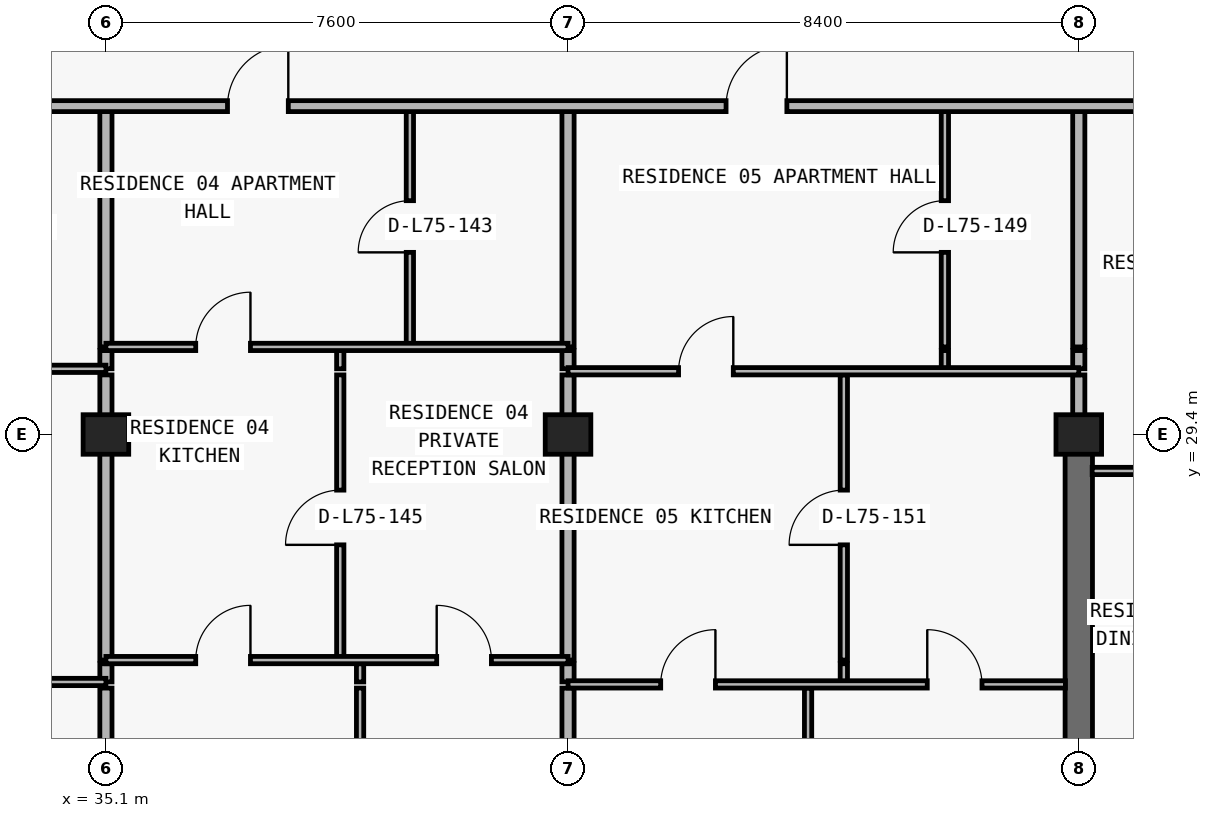
"""IFC4 building model, lengths in metres.
Left out: names, types, materials, properties, quantities, classifications, styles, units other than length and angle.
Written with IfcOpenShell. Run it as: python <this file> out.ifc"""

import sys

from ifc_helpers import new_model, si_unit, direction, frame, frame_2d, origin, origin_2d, place, context, subcontext, project, spatial, rectangle, extrude, element, fill, save


model = new_model("IFC4")
c1 = context("Model", 3, precision=1e-05, world=origin(), true_north=direction((0.0, 1.0)))
c2 = subcontext(c1, "Body", "Model", "MODEL_VIEW")
j1 = project(units=[si_unit("LENGTHUNIT", "METRE"), si_unit("PLANEANGLEUNIT", "RADIAN")], contexts=[c1])
p1 = place(None, origin())
s1 = spatial("IfcSite", under=j1, at=p1, CompositionType="ELEMENT")
p2 = place(p1, origin())
s2 = spatial("IfcBuilding", under=s1, at=p2, CompositionType="ELEMENT")
p3 = place(p2, frame((0.0, 0.0, 266.1)))
s3 = spatial("IfcBuildingStorey", under=s2, at=p3, CompositionType="ELEMENT", Elevation=266.1)
for number, where, z_axis, x_axis in (
    (1, (35.1, 29.4, 0.0), (0.0, 0.0, 1.0), (1.0, 0.0, 0.0)),
    (2, (42.7, 29.4, 0.0), (0.0, 0.0, 1.0), (1.0, 0.0, 0.0)),
    (3, (51.1, 29.4, 0.0), (0.0, 0.0, 1.0), (1.0, 0.0, 0.0)),
):
    element("IfcColumn", number, at=place(p3, frame(where, z_axis=z_axis, x_axis=x_axis)), inside=s3, PredefinedType="COLUMN", context=c2, shape_type="SweptSolid", body=[
        extrude(rectangle(XDim=0.75, YDim=0.65, at=origin_2d()), origin(), (0.0, 0.0, 1.0), 3.0),
    ])
p4 = place(p3, frame((51.1, 20.8, 0.0), z_axis=(0.0, 0.0, 1.0), x_axis=(0.0, 1.0, 0.0)))
e4 = element("IfcWall", 4, at=p4, inside=s3, PredefinedType="SHEAR", context=c2, shape_type="SweptSolid", body=[
    extrude(rectangle(XDim=8.6, YDim=0.45, at=frame_2d((4.3, 0.0))), origin(), (0.0, 0.0, 1.0), 3.0),
])
p5 = place(p3, frame((35.1, 13.34, 0.0), z_axis=(0.0, 0.0, 1.0), x_axis=(0.0, 1.0, 0.0)))
e5 = element("IfcWall", 5, at=p5, inside=s3, PredefinedType="PARTITIONING", context=c2, shape_type="SweptSolid", body=[
    extrude(rectangle(XDim=11.89, YDim=0.2, at=frame_2d((5.945, 0.0))), origin(), (0.0, 0.0, 1.0), 2.213),
])
p6 = place(p3, frame((35.1, 25.33, 0.0), z_axis=(0.0, 0.0, 1.0), x_axis=(0.0, 1.0, 0.0)))
e6 = element("IfcWall", 6, at=p6, inside=s3, PredefinedType="PARTITIONING", context=c2, shape_type="SweptSolid", body=[
    extrude(rectangle(XDim=0.3, YDim=0.2, at=frame_2d((0.15, 0.0))), origin(), (0.0, 0.0, 1.0), 2.213),
])
p7 = place(p3, frame((35.1, 25.69, 0.0), z_axis=(0.0, 0.0, 1.0), x_axis=(0.0, 1.0, 0.0)))
e7 = element("IfcWall", 7, at=p7, inside=s3, PredefinedType="PARTITIONING", context=c2, shape_type="SweptSolid", body=[
    extrude(rectangle(XDim=4.69, YDim=0.2, at=frame_2d((2.345, 0.0))), origin(), (0.0, 0.0, 1.0), 2.213),
])
p8 = place(p3, frame((35.1, 30.48, 0.0), z_axis=(0.0, 0.0, 1.0), x_axis=(0.0, 1.0, 0.0)))
e8 = element("IfcWall", 8, at=p8, inside=s3, PredefinedType="PARTITIONING", context=c2, shape_type="SweptSolid", body=[
    extrude(rectangle(XDim=0.3, YDim=0.2, at=frame_2d((0.15, 0.0))), origin(), (0.0, 0.0, 1.0), 2.213),
])
p9 = place(p3, frame((35.1, 30.84, 0.0), z_axis=(0.0, 0.0, 1.0), x_axis=(0.0, 1.0, 0.0)))
e9 = element("IfcWall", 9, at=p9, inside=s3, PredefinedType="PARTITIONING", context=c2, shape_type="SweptSolid", body=[
    extrude(rectangle(XDim=3.96, YDim=0.2, at=frame_2d((1.98, 0.0))), origin(), (0.0, 0.0, 1.0), 2.213),
])
p10 = place(p3, frame((38.954, 25.69, 0.0), z_axis=(0.0, 0.0, 1.0), x_axis=(0.0, 1.0, 0.0)))
e10 = element("IfcWall", 10, at=p10, inside=s3, PredefinedType="PARTITIONING", context=c2, shape_type="SweptSolid", body=[
    extrude(rectangle(XDim=4.69, YDim=0.12, at=frame_2d((2.345, 0.0))), origin(), (0.0, 0.0, 1.0), 2.579),
])
p11 = place(p10, frame((1.895, 0.0, 0.0)))
e11 = element("IfcOpeningElement", 11, at=p11, cuts=e10, PredefinedType="OPENING", context=c2, shape_type="SweptSolid", body=[
    extrude(rectangle(XDim=0.9, YDim=2.15, at=frame_2d((0.45, 1.075))), frame((0.0, 0.07, 0.0), z_axis=(0.0, -1.0, 0.0), x_axis=(1.0, 0.0, 0.0)), (0.0, 0.0, 1.0), 0.14),
])
p12 = place(p3, frame((38.954, 30.48, 0.0), z_axis=(0.0, 0.0, 1.0), x_axis=(0.0, 1.0, 0.0)))
e12 = element("IfcWall", 12, at=p12, inside=s3, PredefinedType="PARTITIONING", context=c2, shape_type="SweptSolid", body=[
    extrude(rectangle(XDim=0.3, YDim=0.12, at=frame_2d((0.15, 0.0))), origin(), (0.0, 0.0, 1.0), 2.675),
])
p13 = place(p3, frame((39.28, 13.34, 0.0), z_axis=(0.0, 0.0, 1.0), x_axis=(0.0, 1.0, 0.0)))
e13 = element("IfcWall", 13, at=p13, inside=s3, PredefinedType="PARTITIONING", context=c2, shape_type="SweptSolid", body=[
    extrude(rectangle(XDim=11.89, YDim=0.12, at=frame_2d((5.945, 0.0))), origin(), (0.0, 0.0, 1.0), 3.0),
])
p14 = place(p3, frame((39.28, 25.33, 0.0), z_axis=(0.0, 0.0, 1.0), x_axis=(0.0, 1.0, 0.0)))
e14 = element("IfcWall", 14, at=p14, inside=s3, PredefinedType="PARTITIONING", context=c2, shape_type="SweptSolid", body=[
    extrude(rectangle(XDim=0.3, YDim=0.12, at=frame_2d((0.15, 0.0))), origin(), (0.0, 0.0, 1.0), 3.0),
])
p15 = place(p3, frame((40.099, 30.84, 0.0), z_axis=(0.0, 0.0, 1.0), x_axis=(0.0, 1.0, 0.0)))
e15 = element("IfcWall", 15, at=p15, inside=s3, PredefinedType="PARTITIONING", context=c2, shape_type="SweptSolid", body=[
    extrude(rectangle(XDim=3.96, YDim=0.12, at=frame_2d((1.98, 0.0))), origin(), (0.0, 0.0, 1.0), 3.0),
])
p16 = place(p15, frame((1.555, 0.0, 0.0)))
e16 = element("IfcOpeningElement", 16, at=p16, cuts=e15, PredefinedType="OPENING", context=c2, shape_type="SweptSolid", body=[
    extrude(rectangle(XDim=0.85, YDim=2.1, at=frame_2d((0.425, 1.05))), frame((0.0, 0.07, 0.0), z_axis=(0.0, -1.0, 0.0), x_axis=(1.0, 0.0, 0.0)), (0.0, 0.0, 1.0), 0.14),
])
p17 = place(p3, frame((42.7, 13.34, 0.0), z_axis=(0.0, 0.0, 1.0), x_axis=(0.0, 1.0, 0.0)))
e17 = element("IfcWall", 17, at=p17, inside=s3, PredefinedType="PARTITIONING", context=c2, shape_type="SweptSolid", body=[
    extrude(rectangle(XDim=11.89, YDim=0.2, at=frame_2d((5.945, 0.0))), origin(), (0.0, 0.0, 1.0), 2.213),
])
p18 = place(p3, frame((42.7, 25.33, 0.0), z_axis=(0.0, 0.0, 1.0), x_axis=(0.0, 1.0, 0.0)))
e18 = element("IfcWall", 18, at=p18, inside=s3, PredefinedType="PARTITIONING", context=c2, shape_type="SweptSolid", body=[
    extrude(rectangle(XDim=0.3, YDim=0.2, at=frame_2d((0.15, 0.0))), origin(), (0.0, 0.0, 1.0), 2.213),
])
p19 = place(p3, frame((42.7, 25.69, 0.0), z_axis=(0.0, 0.0, 1.0), x_axis=(0.0, 1.0, 0.0)))
e19 = element("IfcWall", 19, at=p19, inside=s3, PredefinedType="PARTITIONING", context=c2, shape_type="SweptSolid", body=[
    extrude(rectangle(XDim=4.69, YDim=0.2, at=frame_2d((2.345, 0.0))), origin(), (0.0, 0.0, 1.0), 2.213),
])
p20 = place(p3, frame((42.7, 30.48, 0.0), z_axis=(0.0, 0.0, 1.0), x_axis=(0.0, 1.0, 0.0)))
e20 = element("IfcWall", 20, at=p20, inside=s3, PredefinedType="PARTITIONING", context=c2, shape_type="SweptSolid", body=[
    extrude(rectangle(XDim=0.3, YDim=0.2, at=frame_2d((0.15, 0.0))), origin(), (0.0, 0.0, 1.0), 2.213),
])
p21 = place(p3, frame((42.7, 30.84, 0.0), z_axis=(0.0, 0.0, 1.0), x_axis=(0.0, 1.0, 0.0)))
e21 = element("IfcWall", 21, at=p21, inside=s3, PredefinedType="PARTITIONING", context=c2, shape_type="SweptSolid", body=[
    extrude(rectangle(XDim=3.96, YDim=0.2, at=frame_2d((1.98, 0.0))), origin(), (0.0, 0.0, 1.0), 2.213),
])
p22 = place(p3, frame((46.648, 13.34, 0.0), z_axis=(0.0, 0.0, 1.0), x_axis=(0.0, 1.0, 0.0)))
e22 = element("IfcWall", 22, at=p22, inside=s3, PredefinedType="PARTITIONING", context=c2, shape_type="SweptSolid", body=[
    extrude(rectangle(XDim=11.89, YDim=0.12, at=frame_2d((5.945, 0.0))), origin(), (0.0, 0.0, 1.0), 3.0),
])
p23 = place(p3, frame((47.236, 25.33, 0.0), z_axis=(0.0, 0.0, 1.0), x_axis=(0.0, 1.0, 0.0)))
e23 = element("IfcWall", 23, at=p23, inside=s3, PredefinedType="PARTITIONING", context=c2, shape_type="SweptSolid", body=[
    extrude(rectangle(XDim=0.3, YDim=0.12, at=frame_2d((0.15, 0.0))), origin(), (0.0, 0.0, 1.0), 3.0),
])
p24 = place(p3, frame((47.236, 25.69, 0.0), z_axis=(0.0, 0.0, 1.0), x_axis=(0.0, 1.0, 0.0)))
e24 = element("IfcWall", 24, at=p24, inside=s3, PredefinedType="PARTITIONING", context=c2, shape_type="SweptSolid", body=[
    extrude(rectangle(XDim=4.69, YDim=0.12, at=frame_2d((2.345, 0.0))), origin(), (0.0, 0.0, 1.0), 3.0),
])
p25 = place(p24, frame((1.895, 0.0, 0.0)))
e25 = element("IfcOpeningElement", 25, at=p25, cuts=e24, PredefinedType="OPENING", context=c2, shape_type="SweptSolid", body=[
    extrude(rectangle(XDim=0.9, YDim=2.15, at=frame_2d((0.45, 1.075))), frame((0.0, 0.07, 0.0), z_axis=(0.0, -1.0, 0.0), x_axis=(1.0, 0.0, 0.0)), (0.0, 0.0, 1.0), 0.14),
])
p26 = place(p3, frame((48.898, 30.48, 0.0), z_axis=(0.0, 0.0, 1.0), x_axis=(0.0, 1.0, 0.0)))
e26 = element("IfcWall", 26, at=p26, inside=s3, PredefinedType="PARTITIONING", context=c2, shape_type="SweptSolid", body=[
    extrude(rectangle(XDim=0.3, YDim=0.12, at=frame_2d((0.15, 0.0))), origin(), (0.0, 0.0, 1.0), 3.0),
])
p27 = place(p3, frame((48.898, 30.84, 0.0), z_axis=(0.0, 0.0, 1.0), x_axis=(0.0, 1.0, 0.0)))
e27 = element("IfcWall", 27, at=p27, inside=s3, PredefinedType="PARTITIONING", context=c2, shape_type="SweptSolid", body=[
    extrude(rectangle(XDim=3.96, YDim=0.12, at=frame_2d((1.98, 0.0))), origin(), (0.0, 0.0, 1.0), 3.0),
])
p28 = place(p27, frame((1.555, 0.0, 0.0)))
e28 = element("IfcOpeningElement", 28, at=p28, cuts=e27, PredefinedType="OPENING", context=c2, shape_type="SweptSolid", body=[
    extrude(rectangle(XDim=0.85, YDim=2.1, at=frame_2d((0.425, 1.05))), frame((0.0, 0.07, 0.0), z_axis=(0.0, -1.0, 0.0), x_axis=(1.0, 0.0, 0.0)), (0.0, 0.0, 1.0), 0.14),
])
p29 = place(p3, frame((51.1, 29.405, 0.0), z_axis=(0.0, 0.0, 1.0), x_axis=(0.0, 1.0, 0.0)))
e29 = element("IfcWall", 29, at=p29, inside=s3, PredefinedType="PARTITIONING", context=c2, shape_type="SweptSolid", body=[
    extrude(rectangle(XDim=0.975, YDim=0.2, at=frame_2d((0.487, 0.0))), origin(), (0.0, 0.0, 1.0), 2.285),
])
p30 = place(p3, frame((51.1, 30.48, 0.0), z_axis=(0.0, 0.0, 1.0), x_axis=(0.0, 1.0, 0.0)))
e30 = element("IfcWall", 30, at=p30, inside=s3, PredefinedType="PARTITIONING", context=c2, shape_type="SweptSolid", body=[
    extrude(rectangle(XDim=0.3, YDim=0.2, at=frame_2d((0.15, 0.0))), origin(), (0.0, 0.0, 1.0), 2.285),
])
p31 = place(p3, frame((51.1, 30.84, 0.0), z_axis=(0.0, 0.0, 1.0), x_axis=(0.0, 1.0, 0.0)))
e31 = element("IfcWall", 31, at=p31, inside=s3, PredefinedType="PARTITIONING", context=c2, shape_type="SweptSolid", body=[
    extrude(rectangle(XDim=3.96, YDim=0.2, at=frame_2d((1.98, 0.0))), origin(), (0.0, 0.0, 1.0), 2.285),
])
p32 = place(p3, frame((42.7, 25.29, 0.0), z_axis=(0.0, 0.0, 1.0), x_axis=(1.0, 0.0, 0.0)))
e32 = element("IfcWall", 32, at=p32, inside=s3, PredefinedType="PARTITIONING", context=c2, shape_type="SweptSolid", body=[
    extrude(rectangle(XDim=8.18, YDim=0.12, at=frame_2d((4.09, 0.0))), origin(), (0.0, 0.0, 1.0), 3.0),
])
p33 = place(p32, frame((1.524, 0.0, 0.0)))
e33 = element("IfcOpeningElement", 33, at=p33, cuts=e32, PredefinedType="OPENING", context=c2, shape_type="SweptSolid", body=[
    extrude(rectangle(XDim=0.9, YDim=2.15, at=frame_2d((0.45, 1.075))), frame((0.0, 0.07, 0.0), z_axis=(0.0, -1.0, 0.0), x_axis=(1.0, 0.0, 0.0)), (0.0, 0.0, 1.0), 0.14),
])
p34 = place(p32, frame((5.908, 0.0, 0.0)))
e34 = element("IfcOpeningElement", 34, at=p34, cuts=e32, PredefinedType="OPENING", context=c2, shape_type="SweptSolid", body=[
    extrude(rectangle(XDim=0.9, YDim=2.15, at=frame_2d((0.45, 1.075))), frame((0.0, 0.07, 0.0), z_axis=(0.0, -1.0, 0.0), x_axis=(1.0, 0.0, 0.0)), (0.0, 0.0, 1.0), 0.14),
])
p35 = place(p3, frame((31.5, 25.33, 0.0), z_axis=(0.0, 0.0, 1.0), x_axis=(1.0, 0.0, 0.0)))
e35 = element("IfcWall", 35, at=p35, inside=s3, PredefinedType="PARTITIONING", context=c2, shape_type="SweptSolid", body=[
    extrude(rectangle(XDim=3.6, YDim=0.12, at=frame_2d((1.8, 0.0))), origin(), (0.0, 0.0, 1.0), 3.0),
])
p36 = place(p35, frame((1.35, 0.0, 0.0)))
e36 = element("IfcOpeningElement", 36, at=p36, cuts=e35, PredefinedType="OPENING", context=c2, shape_type="SweptSolid", body=[
    extrude(rectangle(XDim=0.9, YDim=2.15, at=frame_2d((0.45, 1.075))), frame((0.0, 0.07, 0.0), z_axis=(0.0, -1.0, 0.0), x_axis=(1.0, 0.0, 0.0)), (0.0, 0.0, 1.0), 0.14),
])
p37 = place(p3, frame((35.1, 25.69, 0.0), z_axis=(0.0, 0.0, 1.0), x_axis=(1.0, 0.0, 0.0)))
e37 = element("IfcWall", 37, at=p37, inside=s3, PredefinedType="PARTITIONING", context=c2, shape_type="SweptSolid", body=[
    extrude(rectangle(XDim=7.6, YDim=0.12, at=frame_2d((3.8, 0.0))), origin(), (0.0, 0.0, 1.0), 3.0),
])
p38 = place(p37, frame((1.477, 0.0, 0.0)))
e38 = element("IfcOpeningElement", 38, at=p38, cuts=e37, PredefinedType="OPENING", context=c2, shape_type="SweptSolid", body=[
    extrude(rectangle(XDim=0.9, YDim=2.15, at=frame_2d((0.45, 1.075))), frame((0.0, 0.07, 0.0), z_axis=(0.0, -1.0, 0.0), x_axis=(1.0, 0.0, 0.0)), (0.0, 0.0, 1.0), 0.14),
])
p39 = place(p37, frame((5.44, 0.0, 0.0)))
e39 = element("IfcOpeningElement", 39, at=p39, cuts=e37, PredefinedType="OPENING", context=c2, shape_type="SweptSolid", body=[
    extrude(rectangle(XDim=0.9, YDim=2.15, at=frame_2d((0.45, 1.075))), frame((0.0, 0.07, 0.0), z_axis=(0.0, -1.0, 0.0), x_axis=(1.0, 0.0, 0.0)), (0.0, 0.0, 1.0), 0.14),
])
p40 = place(p3, frame((51.32, 28.8, 0.0), z_axis=(0.0, 0.0, 1.0), x_axis=(1.0, 0.0, 0.0)))
e40 = element("IfcWall", 40, at=p40, inside=s3, PredefinedType="PARTITIONING", context=c2, shape_type="SweptSolid", body=[
    extrude(rectangle(XDim=8.175, YDim=0.12, at=frame_2d((4.087, 0.0))), origin(), (0.0, 0.0, 1.0), 3.0),
])
p41 = place(p40, frame((1.204, 0.0, 0.0)))
e41 = element("IfcOpeningElement", 41, at=p41, cuts=e40, PredefinedType="OPENING", context=c2, shape_type="SweptSolid", body=[
    extrude(rectangle(XDim=0.9, YDim=2.15, at=frame_2d((0.45, 1.075))), frame((0.0, 0.07, 0.0), z_axis=(0.0, -1.0, 0.0), x_axis=(1.0, 0.0, 0.0)), (0.0, 0.0, 1.0), 0.14),
])
p42 = place(p3, frame((42.7, 30.44, 0.0), z_axis=(0.0, 0.0, 1.0), x_axis=(1.0, 0.0, 0.0)))
e42 = element("IfcWall", 42, at=p42, inside=s3, PredefinedType="PARTITIONING", context=c2, shape_type="SweptSolid", body=[
    extrude(rectangle(XDim=8.4, YDim=0.12, at=frame_2d((4.2, 0.0))), origin(), (0.0, 0.0, 1.0), 3.0),
])
p43 = place(p42, frame((1.818, 0.0, 0.0)))
e43 = element("IfcOpeningElement", 43, at=p43, cuts=e42, PredefinedType="OPENING", context=c2, shape_type="SweptSolid", body=[
    extrude(rectangle(XDim=0.9, YDim=2.15, at=frame_2d((0.45, 1.075))), frame((0.0, 0.07, 0.0), z_axis=(0.0, -1.0, 0.0), x_axis=(1.0, 0.0, 0.0)), (0.0, 0.0, 1.0), 0.14),
])
p44 = place(p3, frame((31.5, 30.48, 0.0), z_axis=(0.0, 0.0, 1.0), x_axis=(1.0, 0.0, 0.0)))
e44 = element("IfcWall", 44, at=p44, inside=s3, PredefinedType="PARTITIONING", context=c2, shape_type="SweptSolid", body=[
    extrude(rectangle(XDim=3.6, YDim=0.12, at=frame_2d((1.8, 0.0))), origin(), (0.0, 0.0, 1.0), 3.0),
])
p45 = place(p3, frame((35.1, 30.84, 0.0), z_axis=(0.0, 0.0, 1.0), x_axis=(1.0, 0.0, 0.0)))
e45 = element("IfcWall", 45, at=p45, inside=s3, PredefinedType="PARTITIONING", context=c2, shape_type="SweptSolid", body=[
    extrude(rectangle(XDim=7.6, YDim=0.12, at=frame_2d((3.8, 0.0))), origin(), (0.0, 0.0, 1.0), 3.0),
])
p46 = place(p45, frame((1.477, 0.0, 0.0)))
e46 = element("IfcOpeningElement", 46, at=p46, cuts=e45, PredefinedType="OPENING", context=c2, shape_type="SweptSolid", body=[
    extrude(rectangle(XDim=0.9, YDim=2.15, at=frame_2d((0.45, 1.075))), frame((0.0, 0.07, 0.0), z_axis=(0.0, -1.0, 0.0), x_axis=(1.0, 0.0, 0.0)), (0.0, 0.0, 1.0), 0.14),
])
p47 = place(p3, frame((31.5, 34.8, 0.0), z_axis=(0.0, 0.0, 1.0), x_axis=(1.0, 0.0, 0.0)))
e47 = element("IfcWall", 47, at=p47, inside=s3, PredefinedType="PARTITIONING", context=c2, shape_type="SweptSolid", body=[
    extrude(rectangle(XDim=34.2, YDim=0.18, at=frame_2d((17.1, 0.0))), origin(), (0.0, 0.0, 1.0), 3.0),
])
p48 = place(p47, frame((5.6, 0.0, 0.0)))
e48 = element("IfcOpeningElement", 48, at=p48, cuts=e47, PredefinedType="OPENING", context=c2, shape_type="SweptSolid", body=[
    extrude(rectangle(XDim=1.0, YDim=2.2, at=frame_2d((0.5, 1.1))), frame((0.0, 0.1, 0.0), z_axis=(0.0, -1.0, 0.0), x_axis=(1.0, 0.0, 0.0)), (0.0, 0.0, 1.0), 0.2),
])
p49 = place(p47, frame((13.799, 0.0, 0.0)))
e49 = element("IfcOpeningElement", 49, at=p49, cuts=e47, PredefinedType="OPENING", context=c2, shape_type="SweptSolid", body=[
    extrude(rectangle(XDim=1.0, YDim=2.2, at=frame_2d((0.5, 1.1))), frame((0.0, 0.1, 0.0), z_axis=(0.0, -1.0, 0.0), x_axis=(1.0, 0.0, 0.0)), (0.0, 0.0, 1.0), 0.2),
])
p50 = place(p47, frame((22.483, 0.0, 0.0)))
e50 = element("IfcOpeningElement", 50, at=p50, cuts=e47, PredefinedType="OPENING", context=c2, shape_type="SweptSolid", body=[
    extrude(rectangle(XDim=1.0, YDim=2.2, at=frame_2d((0.5, 1.1))), frame((0.0, 0.1, 0.0), z_axis=(0.0, -1.0, 0.0), x_axis=(1.0, 0.0, 0.0)), (0.0, 0.0, 1.0), 0.2),
])
p51 = place(p48, origin())
e51 = element("IfcDoor", 51, at=p51, inside=s3, OperationType="SINGLE_SWING_RIGHT", PredefinedType="DOOR", context=c2, shape_type="SweptSolid", body=[
    extrude(rectangle(XDim=1.0, YDim=2.2, at=frame_2d((0.5, 1.1))), frame((0.0, 0.025, 0.0), z_axis=(0.0, -1.0, 0.0), x_axis=(1.0, 0.0, 0.0)), (0.0, 0.0, 1.0), 0.05),
])
fill(e48, e51)
p52 = place(p16, origin())
e52 = element("IfcDoor", 52, at=p52, inside=s3, OperationType="SINGLE_SWING_LEFT", PredefinedType="DOOR", context=c2, shape_type="SweptSolid", body=[
    extrude(rectangle(XDim=0.85, YDim=2.1, at=frame_2d((0.425, 1.05))), frame((0.0, 0.025, 0.0), z_axis=(0.0, -1.0, 0.0), x_axis=(1.0, 0.0, 0.0)), (0.0, 0.0, 1.0), 0.05),
])
fill(e16, e52)
p53 = place(p46, origin())
e53 = element("IfcDoor", 53, at=p53, inside=s3, OperationType="SINGLE_SWING_RIGHT", PredefinedType="DOOR", context=c2, shape_type="SweptSolid", body=[
    extrude(rectangle(XDim=0.9, YDim=2.15, at=frame_2d((0.45, 1.075))), frame((0.0, 0.025, 0.0), z_axis=(0.0, -1.0, 0.0), x_axis=(1.0, 0.0, 0.0)), (0.0, 0.0, 1.0), 0.05),
])
fill(e46, e53)
p54 = place(p11, origin())
e54 = element("IfcDoor", 54, at=p54, inside=s3, OperationType="SINGLE_SWING_LEFT", PredefinedType="DOOR", context=c2, shape_type="SweptSolid", body=[
    extrude(rectangle(XDim=0.9, YDim=2.15, at=frame_2d((0.45, 1.075))), frame((0.0, 0.025, 0.0), z_axis=(0.0, -1.0, 0.0), x_axis=(1.0, 0.0, 0.0)), (0.0, 0.0, 1.0), 0.05),
])
fill(e11, e54)
p55 = place(p38, origin())
e55 = element("IfcDoor", 55, at=p55, inside=s3, OperationType="SINGLE_SWING_RIGHT", PredefinedType="DOOR", context=c2, shape_type="SweptSolid", body=[
    extrude(rectangle(XDim=0.9, YDim=2.15, at=frame_2d((0.45, 1.075))), frame((0.0, 0.025, 0.0), z_axis=(0.0, -1.0, 0.0), x_axis=(1.0, 0.0, 0.0)), (0.0, 0.0, 1.0), 0.05),
])
fill(e38, e55)
p56 = place(p39, origin())
e56 = element("IfcDoor", 56, at=p56, inside=s3, OperationType="SINGLE_SWING_LEFT", PredefinedType="DOOR", context=c2, shape_type="SweptSolid", body=[
    extrude(rectangle(XDim=0.9, YDim=2.15, at=frame_2d((0.45, 1.075))), frame((0.0, 0.025, 0.0), z_axis=(0.0, -1.0, 0.0), x_axis=(1.0, 0.0, 0.0)), (0.0, 0.0, 1.0), 0.05),
])
fill(e39, e56)
p57 = place(p49, origin())
e57 = element("IfcDoor", 57, at=p57, inside=s3, OperationType="SINGLE_SWING_RIGHT", PredefinedType="DOOR", context=c2, shape_type="SweptSolid", body=[
    extrude(rectangle(XDim=1.0, YDim=2.2, at=frame_2d((0.5, 1.1))), frame((0.0, 0.025, 0.0), z_axis=(0.0, -1.0, 0.0), x_axis=(1.0, 0.0, 0.0)), (0.0, 0.0, 1.0), 0.05),
])
fill(e49, e57)
p58 = place(p28, origin())
e58 = element("IfcDoor", 58, at=p58, inside=s3, OperationType="SINGLE_SWING_LEFT", PredefinedType="DOOR", context=c2, shape_type="SweptSolid", body=[
    extrude(rectangle(XDim=0.85, YDim=2.1, at=frame_2d((0.425, 1.05))), frame((0.0, 0.025, 0.0), z_axis=(0.0, -1.0, 0.0), x_axis=(1.0, 0.0, 0.0)), (0.0, 0.0, 1.0), 0.05),
])
fill(e28, e58)
p59 = place(p43, origin())
e59 = element("IfcDoor", 59, at=p59, inside=s3, OperationType="SINGLE_SWING_RIGHT", PredefinedType="DOOR", context=c2, shape_type="SweptSolid", body=[
    extrude(rectangle(XDim=0.9, YDim=2.15, at=frame_2d((0.45, 1.075))), frame((0.0, 0.025, 0.0), z_axis=(0.0, -1.0, 0.0), x_axis=(1.0, 0.0, 0.0)), (0.0, 0.0, 1.0), 0.05),
])
fill(e43, e59)
p60 = place(p25, origin())
e60 = element("IfcDoor", 60, at=p60, inside=s3, OperationType="SINGLE_SWING_LEFT", PredefinedType="DOOR", context=c2, shape_type="SweptSolid", body=[
    extrude(rectangle(XDim=0.9, YDim=2.15, at=frame_2d((0.45, 1.075))), frame((0.0, 0.025, 0.0), z_axis=(0.0, -1.0, 0.0), x_axis=(1.0, 0.0, 0.0)), (0.0, 0.0, 1.0), 0.05),
])
fill(e25, e60)
p61 = place(p33, origin())
e61 = element("IfcDoor", 61, at=p61, inside=s3, OperationType="SINGLE_SWING_RIGHT", PredefinedType="DOOR", context=c2, shape_type="SweptSolid", body=[
    extrude(rectangle(XDim=0.9, YDim=2.15, at=frame_2d((0.45, 1.075))), frame((0.0, 0.025, 0.0), z_axis=(0.0, -1.0, 0.0), x_axis=(1.0, 0.0, 0.0)), (0.0, 0.0, 1.0), 0.05),
])
fill(e33, e61)
p62 = place(p34, origin())
e62 = element("IfcDoor", 62, at=p62, inside=s3, OperationType="SINGLE_SWING_LEFT", PredefinedType="DOOR", context=c2, shape_type="SweptSolid", body=[
    extrude(rectangle(XDim=0.9, YDim=2.15, at=frame_2d((0.45, 1.075))), frame((0.0, 0.025, 0.0), z_axis=(0.0, -1.0, 0.0), x_axis=(1.0, 0.0, 0.0)), (0.0, 0.0, 1.0), 0.05),
])
fill(e34, e62)
save(model, sys.argv[1])
